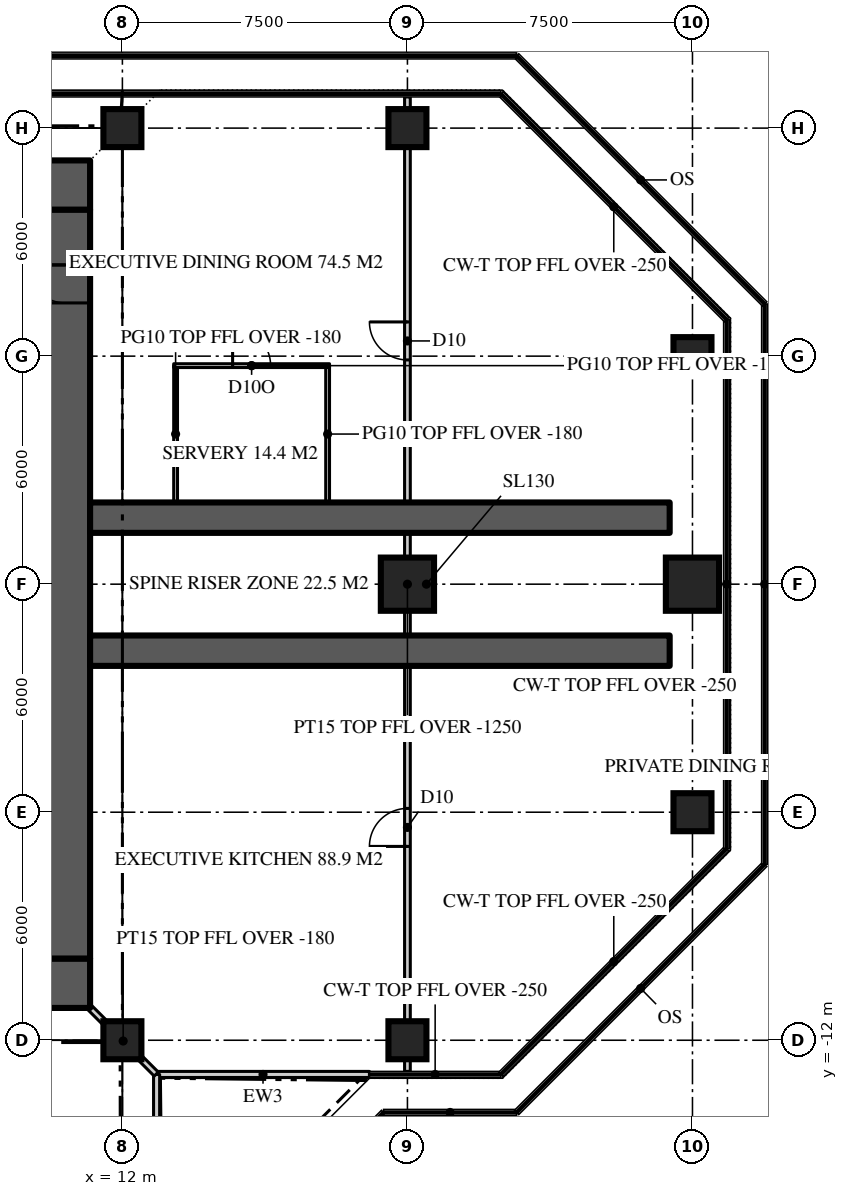
"""IFC4 building model, lengths in metres.
Left out: names, types, materials, properties, quantities, classifications, styles, units other than length and angle.
Written with IfcOpenShell. Run it as: python <this file> out.ifc"""

import sys

from ifc_helpers import new_model, si_unit, direction, frame, frame_2d, origin, origin_2d, place, context, subcontext, project, spatial, rectangle, extrude, element, fill, save


model = new_model("IFC4")
c1 = context("Model", 3, precision=1e-05, world=origin(), true_north=direction((0.0, 1.0)))
c2 = subcontext(c1, "Body", "Model", "MODEL_VIEW")
j1 = project(units=[si_unit("LENGTHUNIT", "METRE"), si_unit("PLANEANGLEUNIT", "RADIAN")], contexts=[c1])
p1 = place(None, origin())
s1 = spatial("IfcSite", under=j1, at=p1, CompositionType="ELEMENT")
p2 = place(p1, origin())
s2 = spatial("IfcBuilding", under=s1, at=p2, CompositionType="ELEMENT")
p3 = place(p2, frame((0.0, 0.0, 302.4)))
s3 = spatial("IfcBuildingStorey", under=s2, at=p3, CompositionType="ELEMENT", Elevation=302.4)
p4 = place(p3, frame((-11.15, 10.5, 0.0), z_axis=(0.0, 0.0, 1.0), x_axis=(1.0, 0.0, 0.0)))
e1 = element("IfcWall", 1, at=p4, inside=s3, PredefinedType="SHEAR", context=c2, shape_type="SweptSolid", body=[
    extrude(rectangle(XDim=22.3, YDim=1.3, at=frame_2d((11.15, 0.0))), origin(), (0.0, 0.0, 1.0), 3.9),
])
p5 = place(p4, frame((4.25, 0.0, 0.0)))
e2 = element("IfcOpeningElement", 2, at=p5, cuts=e1, PredefinedType="OPENING", context=c2, shape_type="SweptSolid", body=[
    extrude(rectangle(XDim=1.8, YDim=2.2, at=frame_2d((0.9, 1.1))), frame((0.0, 0.66, 0.0), z_axis=(0.0, -1.0, 0.0), x_axis=(1.0, 0.0, 0.0)), (0.0, 0.0, 1.0), 1.32),
])
p6 = place(p4, frame((16.25, 0.0, 0.0)))
e3 = element("IfcOpeningElement", 3, at=p6, cuts=e1, PredefinedType="OPENING", context=c2, shape_type="SweptSolid", body=[
    extrude(rectangle(XDim=1.8, YDim=2.2, at=frame_2d((0.9, 1.1))), frame((0.0, 0.66, 0.0), z_axis=(0.0, -1.0, 0.0), x_axis=(1.0, 0.0, 0.0)), (0.0, 0.0, 1.0), 1.32),
])
p7 = place(p3, frame((11.15, -10.5, 0.0), z_axis=(0.0, 0.0, 1.0), x_axis=(-1.0, 0.0, 0.0)))
e4 = element("IfcWall", 4, at=p7, inside=s3, PredefinedType="SHEAR", context=c2, shape_type="SweptSolid", body=[
    extrude(rectangle(XDim=22.3, YDim=1.3, at=frame_2d((11.15, 0.0))), origin(), (0.0, 0.0, 1.0), 3.9),
])
p8 = place(p7, frame((16.25, 0.0, 0.0)))
e5 = element("IfcOpeningElement", 5, at=p8, cuts=e4, PredefinedType="OPENING", context=c2, shape_type="SweptSolid", body=[
    extrude(rectangle(XDim=1.8, YDim=2.2, at=frame_2d((0.9, 1.1))), frame((0.0, 0.66, 0.0), z_axis=(0.0, -1.0, 0.0), x_axis=(1.0, 0.0, 0.0)), (0.0, 0.0, 1.0), 1.32),
])
p9 = place(p7, frame((4.25, 0.0, 0.0)))
e6 = element("IfcOpeningElement", 6, at=p9, cuts=e4, PredefinedType="OPENING", context=c2, shape_type="SweptSolid", body=[
    extrude(rectangle(XDim=1.8, YDim=2.2, at=frame_2d((0.9, 1.1))), frame((0.0, 0.66, 0.0), z_axis=(0.0, -1.0, 0.0), x_axis=(1.0, 0.0, 0.0)), (0.0, 0.0, 1.0), 1.32),
])
p10 = place(p3, frame((10.5, -9.85, 0.0), z_axis=(0.0, 0.0, 1.0), x_axis=(0.0, 1.0, 0.0)))
e7 = element("IfcWall", 7, at=p10, inside=s3, PredefinedType="SHEAR", context=c2, shape_type="SweptSolid", body=[
    extrude(rectangle(XDim=19.7, YDim=1.3, at=frame_2d((9.85, 0.0))), origin(), (0.0, 0.0, 1.0), 3.9),
])
p11 = place(p10, frame((17.25, 0.0, 0.0)))
e8 = element("IfcOpeningElement", 8, at=p11, cuts=e7, PredefinedType="OPENING", context=c2, shape_type="SweptSolid", body=[
    extrude(rectangle(XDim=1.0, YDim=2.2, at=frame_2d((0.5, 1.1))), frame((0.0, 0.66, 0.0), z_axis=(0.0, -1.0, 0.0), x_axis=(1.0, 0.0, 0.0)), (0.0, 0.0, 1.0), 1.32),
])
for number, where, z_axis, x_axis in (
    (9, (11.15, -1.75, 0.0), (0.0, 0.0, 1.0), (1.0, 0.0, 0.0)),
    (10, (11.15, 1.75, 0.0), (0.0, 0.0, 1.0), (1.0, 0.0, 0.0)),
):
    element("IfcWall", number, at=place(p3, frame(where, z_axis=z_axis, x_axis=x_axis)), inside=s3, PredefinedType="SHEAR", context=c2, shape_type="SweptSolid", body=[
        extrude(rectangle(XDim=15.25, YDim=0.8, at=frame_2d((7.625, 0.0))), origin(), (0.0, 0.0, 1.0), 3.9),
    ])
for number, where, z_axis, x_axis in (
    (11, (12.0, -12.0, 0.0), (0.0, 0.0, 1.0), (1.0, 0.0, 0.0)),
    (12, (19.5, -12.0, 0.0), (0.0, 0.0, 1.0), (1.0, 0.0, 0.0)),
    (13, (27.0, -6.0, 0.0), (0.0, 0.0, 1.0), (1.0, 0.0, 0.0)),
):
    element("IfcColumn", number, at=place(p3, frame(where, z_axis=z_axis, x_axis=x_axis)), inside=s3, PredefinedType="COLUMN", context=c2, shape_type="SweptSolid", body=[
        extrude(rectangle(XDim=1.0, YDim=1.0, at=origin_2d()), origin(), (0.0, 0.0, 1.0), 3.9),
    ])
for number, where, z_axis, x_axis in (
    (14, (19.5, 0.0, 0.0), (0.0, 0.0, 1.0), (1.0, 0.0, 0.0)),
    (15, (27.0, 0.0, 0.0), (0.0, 0.0, 1.0), (1.0, 0.0, 0.0)),
):
    element("IfcColumn", number, at=place(p3, frame(where, z_axis=z_axis, x_axis=x_axis)), inside=s3, PredefinedType="COLUMN", context=c2, shape_type="SweptSolid", body=[
        extrude(rectangle(XDim=1.4, YDim=1.4, at=origin_2d()), origin(), (0.0, 0.0, 1.0), 3.9),
    ])
for number, where, z_axis, x_axis in (
    (16, (27.0, 6.0, 0.0), (0.0, 0.0, 1.0), (1.0, 0.0, 0.0)),
    (17, (12.0, 12.0, 0.0), (0.0, 0.0, 1.0), (1.0, 0.0, 0.0)),
    (18, (19.5, 12.0, 0.0), (0.0, 0.0, 1.0), (1.0, 0.0, 0.0)),
):
    element("IfcColumn", number, at=place(p3, frame(where, z_axis=z_axis, x_axis=x_axis)), inside=s3, PredefinedType="COLUMN", context=c2, shape_type="SweptSolid", body=[
        extrude(rectangle(XDim=1.0, YDim=1.0, at=origin_2d()), origin(), (0.0, 0.0, 1.0), 3.9),
    ])
p12 = place(p3, frame((12.9, -12.9, 0.0), z_axis=(0.0, 0.0, 1.0), x_axis=(1.0, 0.0, 0.0)))
e19 = element("IfcWall", 19, at=p12, inside=s3, PredefinedType="SOLIDWALL", context=c2, shape_type="SweptSolid", body=[
    extrude(rectangle(XDim=5.6, YDim=0.16, at=frame_2d((2.8, 0.0))), origin(), (0.0, 0.0, 1.0), 3.65),
])
p13 = place(p3, frame((12.9, -18.5, 0.0), z_axis=(0.0, 0.0, 1.0), x_axis=(0.0, 1.0, 0.0)))
e20 = element("IfcWall", 20, at=p13, inside=s3, PredefinedType="SOLIDWALL", context=c2, shape_type="SweptSolid", body=[
    extrude(rectangle(XDim=5.6, YDim=0.16, at=frame_2d((2.8, 0.0))), origin(), (0.0, 0.0, 1.0), 3.65),
])
p14 = place(p13, frame((2.3, 0.0, 0.0)))
e21 = element("IfcOpeningElement", 21, at=p14, cuts=e20, PredefinedType="OPENING", context=c2, shape_type="SweptSolid", body=[
    extrude(rectangle(XDim=1.0, YDim=2.2, at=frame_2d((0.5, 1.1))), frame((0.0, 0.09, 0.0), z_axis=(0.0, -1.0, 0.0), x_axis=(1.0, 0.0, 0.0)), (0.0, 0.0, 1.0), 0.18),
])
p15 = place(p3, frame((19.5, -12.82, 0.0), z_axis=(0.0, 0.0, 1.0), x_axis=(0.0, 1.0, 0.0)))
e22 = element("IfcWall", 22, at=p15, inside=s3, PredefinedType="PARTITIONING", context=c2, shape_type="SweptSolid", body=[
    extrude(rectangle(XDim=25.64, YDim=0.15, at=frame_2d((12.82, 0.0))), origin(), (0.0, 0.0, 1.0), 2.65),
])
p16 = place(p15, frame((18.72, 0.0, 0.0)))
e23 = element("IfcOpeningElement", 23, at=p16, cuts=e22, PredefinedType="OPENING", context=c2, shape_type="SweptSolid", body=[
    extrude(rectangle(XDim=1.0, YDim=2.2, at=frame_2d((0.5, 1.1))), frame((0.0, 0.085, 0.0), z_axis=(0.0, -1.0, 0.0), x_axis=(1.0, 0.0, 0.0)), (0.0, 0.0, 1.0), 0.17),
])
p17 = place(p15, frame((5.92, 0.0, 0.0)))
e24 = element("IfcOpeningElement", 24, at=p17, cuts=e22, PredefinedType="OPENING", context=c2, shape_type="SweptSolid", body=[
    extrude(rectangle(XDim=1.0, YDim=2.2, at=frame_2d((0.5, 1.1))), frame((0.0, 0.085, 0.0), z_axis=(0.0, -1.0, 0.0), x_axis=(1.0, 0.0, 0.0)), (0.0, 0.0, 1.0), 0.17),
])
for number, where, z_axis, x_axis in (
    (25, (13.4, 2.15, 0.0), (0.0, 0.0, 1.0), (0.0, 1.0, 0.0)),
    (26, (17.4, 2.15, 0.0), (0.0, 0.0, 1.0), (0.0, 1.0, 0.0)),
):
    element("IfcWall", number, at=place(p3, frame(where, z_axis=z_axis, x_axis=x_axis)), inside=s3, PredefinedType="PARTITIONING", context=c2, shape_type="SweptSolid", body=[
        extrude(rectangle(XDim=3.6, YDim=0.1, at=frame_2d((1.8, 0.0))), origin(), (0.0, 0.0, 1.0), 3.72),
    ])
p18 = place(p3, frame((13.35, 5.75, 0.0), z_axis=(0.0, 0.0, 1.0), x_axis=(1.0, 0.0, 0.0)))
e27 = element("IfcWall", 27, at=p18, inside=s3, PredefinedType="PARTITIONING", context=c2, shape_type="SweptSolid", body=[
    extrude(rectangle(XDim=4.1, YDim=0.1, at=frame_2d((2.05, 0.0))), origin(), (0.0, 0.0, 1.0), 3.72),
])
p19 = place(p18, frame((1.55, 0.0, 0.0)))
e28 = element("IfcOpeningElement", 28, at=p19, cuts=e27, PredefinedType="OPENING", context=c2, shape_type="SweptSolid", body=[
    extrude(rectangle(XDim=1.0, YDim=2.2, at=frame_2d((0.5, 1.1))), frame((0.0, 0.06, 0.0), z_axis=(0.0, -1.0, 0.0), x_axis=(1.0, 0.0, 0.0)), (0.0, 0.0, 1.0), 0.12),
])
p20 = place(p3, frame((11.15, -11.15, 0.0), z_axis=(0.0, 0.0, 1.0), x_axis=(0.707106781187, -0.707106781187, 0.0)))
e29 = element("IfcWall", 29, at=p20, inside=s3, PredefinedType="PARTITIONING", context=c2, shape_type="SweptSolid", body=[
    extrude(rectangle(XDim=2.461, YDim=0.15, at=frame_2d((1.23, 0.0))), origin(), (0.0, 0.0, 1.0), 3.72),
])
p21 = place(p11, origin())
e30 = element("IfcDoor", 30, at=p21, inside=s3, OperationType="SINGLE_SWING_RIGHT", PredefinedType="DOOR", context=c2, shape_type="SweptSolid", body=[
    extrude(rectangle(XDim=1.0, YDim=2.2, at=frame_2d((0.5, 1.1))), frame((0.0, 0.025, 0.0), z_axis=(0.0, -1.0, 0.0), x_axis=(1.0, 0.0, 0.0)), (0.0, 0.0, 1.0), 0.05),
])
fill(e8, e30)
p22 = place(p16, origin())
e31 = element("IfcDoor", 31, at=p22, inside=s3, OperationType="SINGLE_SWING_RIGHT", PredefinedType="DOOR", context=c2, shape_type="SweptSolid", body=[
    extrude(rectangle(XDim=1.0, YDim=2.2, at=frame_2d((0.5, 1.1))), frame((0.0, 0.025, 0.0), z_axis=(0.0, -1.0, 0.0), x_axis=(1.0, 0.0, 0.0)), (0.0, 0.0, 1.0), 0.05),
])
fill(e23, e31)
p23 = place(p17, origin())
e32 = element("IfcDoor", 32, at=p23, inside=s3, OperationType="SINGLE_SWING_LEFT", PredefinedType="DOOR", context=c2, shape_type="SweptSolid", body=[
    extrude(rectangle(XDim=1.0, YDim=2.2, at=frame_2d((0.5, 1.1))), frame((0.0, 0.025, 0.0), z_axis=(0.0, -1.0, 0.0), x_axis=(1.0, 0.0, 0.0)), (0.0, 0.0, 1.0), 0.05),
])
fill(e24, e32)
p24 = place(p19, origin())
e33 = element("IfcDoor", 33, at=p24, inside=s3, OperationType="SINGLE_SWING_LEFT", PredefinedType="DOOR", context=c2, shape_type="SweptSolid", body=[
    extrude(rectangle(XDim=1.0, YDim=2.2, at=frame_2d((0.5, 1.1))), frame((0.0, 0.025, 0.0), z_axis=(0.0, -1.0, 0.0), x_axis=(1.0, 0.0, 0.0)), (0.0, 0.0, 1.0), 0.05),
])
fill(e28, e33)
save(model, sys.argv[1])
